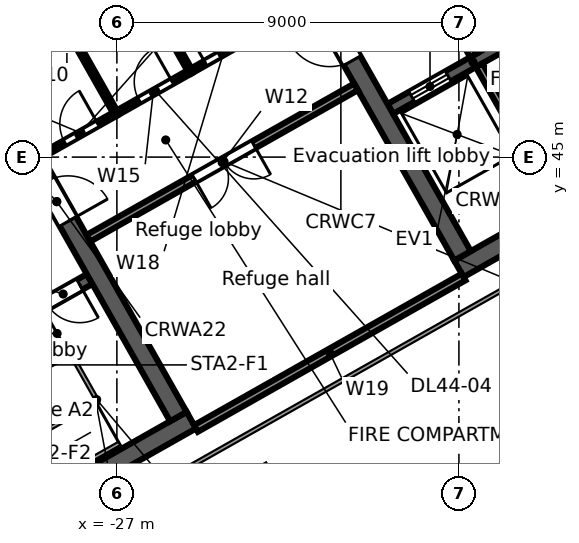
"""IFC4 building model, lengths in metres.
Left out: names, types, materials, properties, quantities, classifications, styles, units other than length and angle.
Written with IfcOpenShell. Run it as: python <this file> out.ifc"""

import sys

from ifc_helpers import new_model, si_unit, direction, frame, frame_2d, origin, origin_2d, place, context, subcontext, project, spatial, rectangle, extrude, element, fill, save


model = new_model("IFC4")
c1 = context("Model", 3, precision=1e-05, world=origin(), true_north=direction((0.0, 1.0)))
c2 = subcontext(c1, "Body", "Model", "MODEL_VIEW")
j1 = project(units=[si_unit("LENGTHUNIT", "METRE"), si_unit("PLANEANGLEUNIT", "RADIAN")], contexts=[c1])
p1 = place(None, origin())
s1 = spatial("IfcSite", under=j1, at=p1, CompositionType="ELEMENT")
p2 = place(p1, origin())
s2 = spatial("IfcBuilding", under=s1, at=p2, CompositionType="ELEMENT")
p3 = place(p2, frame((0.0, 0.0, 202.9)))
s3 = spatial("IfcBuildingStorey", under=s2, at=p3, CompositionType="ELEMENT", Elevation=202.9)
p4 = place(p3, frame((-23.356, 35.946, 0.0), z_axis=(0.0, 0.0, 1.0), x_axis=(0.87035569594, 0.492423560103, 0.0)))
e1 = element("IfcColumn", 1, at=p4, inside=s3, PredefinedType="COLUMN", context=c2, shape_type="SweptSolid", body=[
    extrude(rectangle(XDim=1.5, YDim=1.5, at=origin_2d()), origin(), (0.0, 0.0, 1.0), 4.6),
])
p5 = place(p3, frame((-39.838, 29.705, 0.0), z_axis=(0.0, 0.0, 1.0), x_axis=(0.870350116061, 0.492433422375, 0.0)))
e2 = element("IfcWall", 2, at=p5, inside=s3, PredefinedType="SOLIDWALL", context=c2, shape_type="SweptSolid", body=[
    extrude(rectangle(XDim=17.0, YDim=0.5, at=frame_2d((8.5, 0.0))), origin(), (0.0, 0.0, 1.0), 4.32),
])
p6 = place(p5, frame((7.2, 0.0, 0.0)))
e3 = element("IfcOpeningElement", 3, at=p6, cuts=e2, PredefinedType="OPENING", context=c2, shape_type="SweptSolid", body=[
    extrude(rectangle(XDim=1.2, YDim=2.1, at=frame_2d((0.6, 1.05))), frame((0.0, 0.26, 0.0), z_axis=(0.0, -1.0, 0.0), x_axis=(1.0, 0.0, 0.0)), (0.0, 0.0, 1.0), 0.52),
])
p7 = place(p3, frame((-34.245, 38.097, 0.0), z_axis=(0.0, 0.0, 1.0), x_axis=(0.870364520461, 0.492407962489, 0.0)))
e4 = element("IfcWall", 4, at=p7, inside=s3, PredefinedType="SOLIDWALL", context=c2, shape_type="SweptSolid", body=[
    extrude(rectangle(XDim=7.5, YDim=0.3, at=frame_2d((3.75, 0.0))), origin(), (0.0, 0.0, 1.0), 4.32),
])
p8 = place(p7, frame((6.2, 0.0, 0.0)))
e5 = element("IfcOpeningElement", 5, at=p8, cuts=e4, PredefinedType="OPENING", context=c2, shape_type="SweptSolid", body=[
    extrude(rectangle(XDim=1.0, YDim=2.1, at=frame_2d((0.5, 1.05))), frame((0.0, 0.16, 0.0), z_axis=(0.0, -1.0, 0.0), x_axis=(1.0, 0.0, 0.0)), (0.0, 0.0, 1.0), 0.32),
])
p9 = place(p3, frame((-31.784, 49.486, 0.0), z_axis=(0.0, 0.0, 1.0), x_axis=(0.492435316254, -0.870349044525, 0.0)))
e6 = element("IfcWall", 6, at=p9, inside=s3, PredefinedType="SOLIDWALL", context=c2, shape_type="SweptSolid", body=[
    extrude(rectangle(XDim=13.0, YDim=0.5, at=frame_2d((6.5, 0.0))), origin(), (0.0, 0.0, 1.0), 4.32),
])
p10 = place(p9, frame((5.9, 0.0, 0.0)))
e7 = element("IfcOpeningElement", 7, at=p10, cuts=e6, PredefinedType="OPENING", context=c2, shape_type="SweptSolid", body=[
    extrude(rectangle(XDim=1.2, YDim=2.1, at=frame_2d((0.6, 1.05))), frame((0.0, 0.26, 0.0), z_axis=(0.0, -1.0, 0.0), x_axis=(1.0, 0.0, 0.0)), (0.0, 0.0, 1.0), 0.52),
])
p11 = place(p3, frame((-18.0, 42.061, 0.0), z_axis=(0.0, 0.0, 1.0), x_axis=(0.870356627484, 0.492421913601, 0.0)))
e8 = element("IfcWall", 8, at=p11, inside=s3, PredefinedType="SOLIDWALL", context=c2, shape_type="SweptSolid", body=[
    extrude(rectangle(XDim=15.0, YDim=0.5, at=frame_2d((7.5, 0.0))), origin(), (0.0, 0.0, 1.0), 4.32),
])
p12 = place(p11, frame((6.1, 0.0, 0.0)))
e9 = element("IfcOpeningElement", 9, at=p12, cuts=e8, PredefinedType="OPENING", context=c2, shape_type="SweptSolid", body=[
    extrude(rectangle(XDim=1.2, YDim=2.1, at=frame_2d((0.6, 1.05))), frame((0.0, 0.26, 0.0), z_axis=(0.0, -1.0, 0.0), x_axis=(1.0, 0.0, 0.0)), (0.0, 0.0, 1.0), 0.52),
])
p13 = place(p3, frame((-19.805, 46.267, 0.0), z_axis=(0.0, 0.0, 1.0), x_axis=(0.870353598469, 0.492427267353, 0.0)))
e10 = element("IfcWall", 10, at=p13, inside=s3, PredefinedType="SOLIDWALL", context=c2, shape_type="SweptSolid", body=[
    extrude(rectangle(XDim=5.0, YDim=0.3, at=frame_2d((2.5, 0.0))), origin(), (0.0, 0.0, 1.0), 4.32),
])
p14 = place(p13, frame((0.65, 0.0, 0.0)))
e11 = element("IfcOpeningElement", 11, at=p14, cuts=e10, PredefinedType="OPENING", context=c2, shape_type="SweptSolid", body=[
    extrude(rectangle(XDim=1.1, YDim=2.1, at=frame_2d((0.55, 1.05))), frame((0.0, 0.16, 0.0), z_axis=(0.0, -1.0, 0.0), x_axis=(1.0, 0.0, 0.0)), (0.0, 0.0, 1.0), 0.32),
])
p15 = place(p13, frame((3.75, 0.0, 0.0)))
e12 = element("IfcOpeningElement", 12, at=p15, cuts=e10, PredefinedType="OPENING", context=c2, shape_type="SweptSolid", body=[
    extrude(rectangle(XDim=0.9, YDim=2.1, at=frame_2d((0.45, 1.05))), frame((0.0, 0.16, 0.0), z_axis=(0.0, -1.0, 0.0), x_axis=(1.0, 0.0, 0.0)), (0.0, 0.0, 1.0), 0.32),
])
p16 = place(p3, frame((-24.307, 53.716, 0.0), z_axis=(0.0, 0.0, 1.0), x_axis=(0.492427267353, -0.870353598469, 0.0)))
e13 = element("IfcWall", 13, at=p16, inside=s3, PredefinedType="SOLIDWALL", context=c2, shape_type="SweptSolid", body=[
    extrude(rectangle(XDim=13.0, YDim=0.5, at=frame_2d((6.5, 0.0))), origin(), (0.0, 0.0, 1.0), 4.32),
])
p17 = place(p16, frame((5.9, 0.0, 0.0)))
e14 = element("IfcOpeningElement", 14, at=p17, cuts=e13, PredefinedType="OPENING", context=c2, shape_type="SweptSolid", body=[
    extrude(rectangle(XDim=1.2, YDim=2.1, at=frame_2d((0.6, 1.05))), frame((0.0, 0.26, 0.0), z_axis=(0.0, -1.0, 0.0), x_axis=(1.0, 0.0, 0.0)), (0.0, 0.0, 1.0), 0.52),
])
p18 = place(p3, frame((-17.469, 47.417, 0.0), z_axis=(0.0, 0.0, 1.0), x_axis=(0.492441017253, -0.870345818929, 0.0)))
e15 = element("IfcWall", 15, at=p18, inside=s3, PredefinedType="SOLIDWALL", context=c2, shape_type="SweptSolid", body=[
    extrude(rectangle(XDim=4.15, YDim=0.2, at=frame_2d((2.075, 0.0))), origin(), (0.0, 0.0, 1.0), 4.32),
])
p19 = place(p3, frame((-19.635, 51.246, 0.0), z_axis=(0.0, 0.0, 1.0), x_axis=(0.492408451753, -0.87036424366, 0.0)))
e16 = element("IfcWall", 16, at=p19, inside=s3, PredefinedType="PARTITIONING", context=c2, shape_type="SweptSolid", body=[
    extrude(rectangle(XDim=4.1, YDim=0.2, at=frame_2d((2.05, 0.0))), origin(), (0.0, 0.0, 1.0), 4.32),
])
p20 = place(p19, frame((1.55, 0.0, 0.0)))
e17 = element("IfcOpeningElement", 17, at=p20, cuts=e16, PredefinedType="OPENING", context=c2, shape_type="SweptSolid", body=[
    extrude(rectangle(XDim=1.0, YDim=2.1, at=frame_2d((0.5, 1.05))), frame((0.0, 0.11, 0.0), z_axis=(0.0, -1.0, 0.0), x_axis=(1.0, 0.0, 0.0)), (0.0, 0.0, 1.0), 0.22),
])
p21 = place(p3, frame((-29.608, 50.717, 0.0), z_axis=(0.0, 0.0, 1.0), x_axis=(0.492328430905, -0.870409510588, 0.0)))
e18 = element("IfcWall", 18, at=p21, inside=s3, PredefinedType="PARTITIONING", context=c2, shape_type="SweptSolid", body=[
    extrude(rectangle(XDim=5.25, YDim=0.125, at=frame_2d((2.625, 0.0))), origin(), (0.0, 0.0, 1.0), 4.32),
])
p22 = place(p3, frame((-28.981, 45.039, 0.0), z_axis=(0.0, 0.0, 1.0), x_axis=(0.870332332106, 0.492464853254, 0.0)))
e19 = element("IfcWall", 19, at=p22, inside=s3, PredefinedType="PARTITIONING", context=c2, shape_type="SweptSolid", body=[
    extrude(rectangle(XDim=2.25, YDim=0.125, at=frame_2d((1.125, 0.0))), origin(), (0.0, 0.0, 1.0), 4.32),
])
p23 = place(p22, frame((0.7, 0.0, 0.0)))
e20 = element("IfcOpeningElement", 20, at=p23, cuts=e19, PredefinedType="OPENING", context=c2, shape_type="SweptSolid", body=[
    extrude(rectangle(XDim=1.0, YDim=2.1, at=frame_2d((0.5, 1.05))), frame((0.0, 0.073, 0.0), z_axis=(0.0, -1.0, 0.0), x_axis=(1.0, 0.0, 0.0)), (0.0, 0.0, 1.0), 0.145),
])
p24 = place(p3, frame((-27.75, 42.864, 0.0), z_axis=(0.0, 0.0, 1.0), x_axis=(0.870370568162, 0.492397272614, 0.0)))
e21 = element("IfcWall", 21, at=p24, inside=s3, PredefinedType="PARTITIONING", context=c2, shape_type="SweptSolid", body=[
    extrude(rectangle(XDim=8.091, YDim=0.2, at=frame_2d((4.045, 0.0))), origin(), (0.0, 0.0, 1.0), 3.592),
])
p25 = place(p24, frame((3.2, 0.0, 0.0)))
e22 = element("IfcOpeningElement", 22, at=p25, cuts=e21, PredefinedType="OPENING", context=c2, shape_type="SweptSolid", body=[
    extrude(rectangle(XDim=1.8, YDim=2.1, at=frame_2d((0.9, 1.05))), frame((0.0, 0.11, 0.0), z_axis=(0.0, -1.0, 0.0), x_axis=(1.0, 0.0, 0.0)), (0.0, 0.0, 1.0), 0.22),
])
p26 = place(p3, frame((-27.65, 51.825, 0.0), z_axis=(0.0, 0.0, 1.0), x_axis=(0.492469323632, -0.870329802593, 0.0)))
e23 = element("IfcWall", 23, at=p26, inside=s3, PredefinedType="PARTITIONING", context=c2, shape_type="SweptSolid", body=[
    extrude(rectangle(XDim=5.251, YDim=0.125, at=frame_2d((2.625, 0.0))), origin(), (0.0, 0.0, 1.0), 4.32),
])
p27 = place(p3, frame((-27.023, 46.147, 0.0), z_axis=(0.0, 0.0, 1.0), x_axis=(0.870437546499, 0.492278861667, 0.0)))
e24 = element("IfcWall", 24, at=p27, inside=s3, PredefinedType="PARTITIONING", context=c2, shape_type="SweptSolid", body=[
    extrude(rectangle(XDim=2.25, YDim=0.125, at=frame_2d((1.125, 0.0))), origin(), (0.0, 0.0, 1.0), 4.32),
])
p28 = place(p27, frame((0.7, 0.0, 0.0)))
e25 = element("IfcOpeningElement", 25, at=p28, cuts=e24, PredefinedType="OPENING", context=c2, shape_type="SweptSolid", body=[
    extrude(rectangle(XDim=1.0, YDim=2.1, at=frame_2d((0.5, 1.05))), frame((0.0, 0.073, 0.0), z_axis=(0.0, -1.0, 0.0), x_axis=(1.0, 0.0, 0.0)), (0.0, 0.0, 1.0), 0.145),
])
p29 = place(p3, frame((-25.064, 47.255, 0.0), z_axis=(0.0, 0.0, 1.0), x_axis=(0.87021240934, 0.492676732382, 0.0)))
e26 = element("IfcWall", 26, at=p29, inside=s3, PredefinedType="PARTITIONING", context=c2, shape_type="SweptSolid", body=[
    extrude(rectangle(XDim=2.0, YDim=0.125, at=frame_2d((1.0, 0.0))), origin(), (0.0, 0.0, 1.0), 4.32),
])
p30 = place(p29, frame((0.45, 0.0, 0.0)))
e27 = element("IfcOpeningElement", 27, at=p30, cuts=e26, PredefinedType="OPENING", context=c2, shape_type="SweptSolid", body=[
    extrude(rectangle(XDim=1.0, YDim=2.1, at=frame_2d((0.5, 1.05))), frame((0.0, 0.073, 0.0), z_axis=(0.0, -1.0, 0.0), x_axis=(1.0, 0.0, 0.0)), (0.0, 0.0, 1.0), 0.145),
])
p31 = place(p3, frame((-24.919, 37.859, 0.0), z_axis=(0.0, 0.0, 1.0), x_axis=(0.870357635969, 0.492420131098, 0.0)))
e28 = element("IfcWall", 28, at=p31, inside=s3, PredefinedType="PARTITIONING", context=c2, shape_type="SweptSolid", body=[
    extrude(rectangle(XDim=8.091, YDim=0.2, at=frame_2d((4.045, 0.0))), origin(), (0.0, 0.0, 1.0), 3.592),
])
p32 = place(p8, frame((1.0, 0.0, 0.0), z_axis=(0.0, 0.0, 1.0), x_axis=(-1.0, 0.0, 0.0)))
e29 = element("IfcDoor", 29, at=p32, inside=s3, OperationType="SINGLE_SWING_LEFT", PredefinedType="DOOR", context=c2, shape_type="SweptSolid", body=[
    extrude(rectangle(XDim=1.0, YDim=2.1, at=frame_2d((0.5, 1.05))), frame((0.0, 0.025, 0.0), z_axis=(0.0, -1.0, 0.0), x_axis=(1.0, 0.0, 0.0)), (0.0, 0.0, 1.0), 0.05),
])
fill(e5, e29)
p33 = place(p10, origin())
e30 = element("IfcDoor", 30, at=p33, inside=s3, OperationType="SINGLE_SWING_RIGHT", PredefinedType="DOOR", context=c2, shape_type="SweptSolid", body=[
    extrude(rectangle(XDim=1.2, YDim=2.1, at=frame_2d((0.6, 1.05))), frame((0.0, 0.025, 0.0), z_axis=(0.0, -1.0, 0.0), x_axis=(1.0, 0.0, 0.0)), (0.0, 0.0, 1.0), 0.05),
])
fill(e7, e30)
p34 = place(p14, origin())
e31 = element("IfcDoor", 31, at=p34, inside=s3, OperationType="DOUBLE_DOOR_SLIDING", PredefinedType="DOOR", context=c2, shape_type="SweptSolid", body=[
    extrude(rectangle(XDim=1.1, YDim=2.1, at=frame_2d((0.55, 1.05))), frame((0.0, 0.025, 0.0), z_axis=(0.0, -1.0, 0.0), x_axis=(1.0, 0.0, 0.0)), (0.0, 0.0, 1.0), 0.05),
])
fill(e11, e31)
p35 = place(p17, frame((1.2, 0.0, 0.0), z_axis=(0.0, 0.0, 1.0), x_axis=(-1.0, 0.0, 0.0)))
e32 = element("IfcDoor", 32, at=p35, inside=s3, OperationType="SINGLE_SWING_RIGHT", PredefinedType="DOOR", context=c2, shape_type="SweptSolid", body=[
    extrude(rectangle(XDim=1.2, YDim=2.1, at=frame_2d((0.6, 1.05))), frame((0.0, 0.025, 0.0), z_axis=(0.0, -1.0, 0.0), x_axis=(1.0, 0.0, 0.0)), (0.0, 0.0, 1.0), 0.05),
])
fill(e14, e32)
p36 = place(p23, origin())
e33 = element("IfcDoor", 33, at=p36, inside=s3, OperationType="SINGLE_SWING_RIGHT", PredefinedType="DOOR", context=c2, shape_type="SweptSolid", body=[
    extrude(rectangle(XDim=1.0, YDim=2.1, at=frame_2d((0.5, 1.05))), frame((0.0, 0.025, 0.0), z_axis=(0.0, -1.0, 0.0), x_axis=(1.0, 0.0, 0.0)), (0.0, 0.0, 1.0), 0.05),
])
fill(e20, e33)
p37 = place(p28, origin())
e34 = element("IfcDoor", 34, at=p37, inside=s3, OperationType="SINGLE_SWING_RIGHT", PredefinedType="DOOR", context=c2, shape_type="SweptSolid", body=[
    extrude(rectangle(XDim=1.0, YDim=2.1, at=frame_2d((0.5, 1.05))), frame((0.0, 0.025, 0.0), z_axis=(0.0, -1.0, 0.0), x_axis=(1.0, 0.0, 0.0)), (0.0, 0.0, 1.0), 0.05),
])
fill(e25, e34)
p38 = place(p30, origin())
e35 = element("IfcDoor", 35, at=p38, inside=s3, OperationType="SINGLE_SWING_LEFT", PredefinedType="DOOR", context=c2, shape_type="SweptSolid", body=[
    extrude(rectangle(XDim=1.0, YDim=2.1, at=frame_2d((0.5, 1.05))), frame((0.0, 0.025, 0.0), z_axis=(0.0, -1.0, 0.0), x_axis=(1.0, 0.0, 0.0)), (0.0, 0.0, 1.0), 0.05),
])
fill(e27, e35)
p39 = place(p25, frame((1.8, 0.0, 0.0), z_axis=(0.0, 0.0, 1.0), x_axis=(-1.0, 0.0, 0.0)))
e36 = element("IfcDoor", 36, at=p39, inside=s3, OperationType="DOUBLE_DOOR_SINGLE_SWING", PredefinedType="DOOR", context=c2, shape_type="SweptSolid", body=[
    extrude(rectangle(XDim=1.8, YDim=2.1, at=frame_2d((0.9, 1.05))), frame((0.0, 0.025, 0.0), z_axis=(0.0, -1.0, 0.0), x_axis=(1.0, 0.0, 0.0)), (0.0, 0.0, 1.0), 0.05),
])
fill(e22, e36)
save(model, sys.argv[1])
